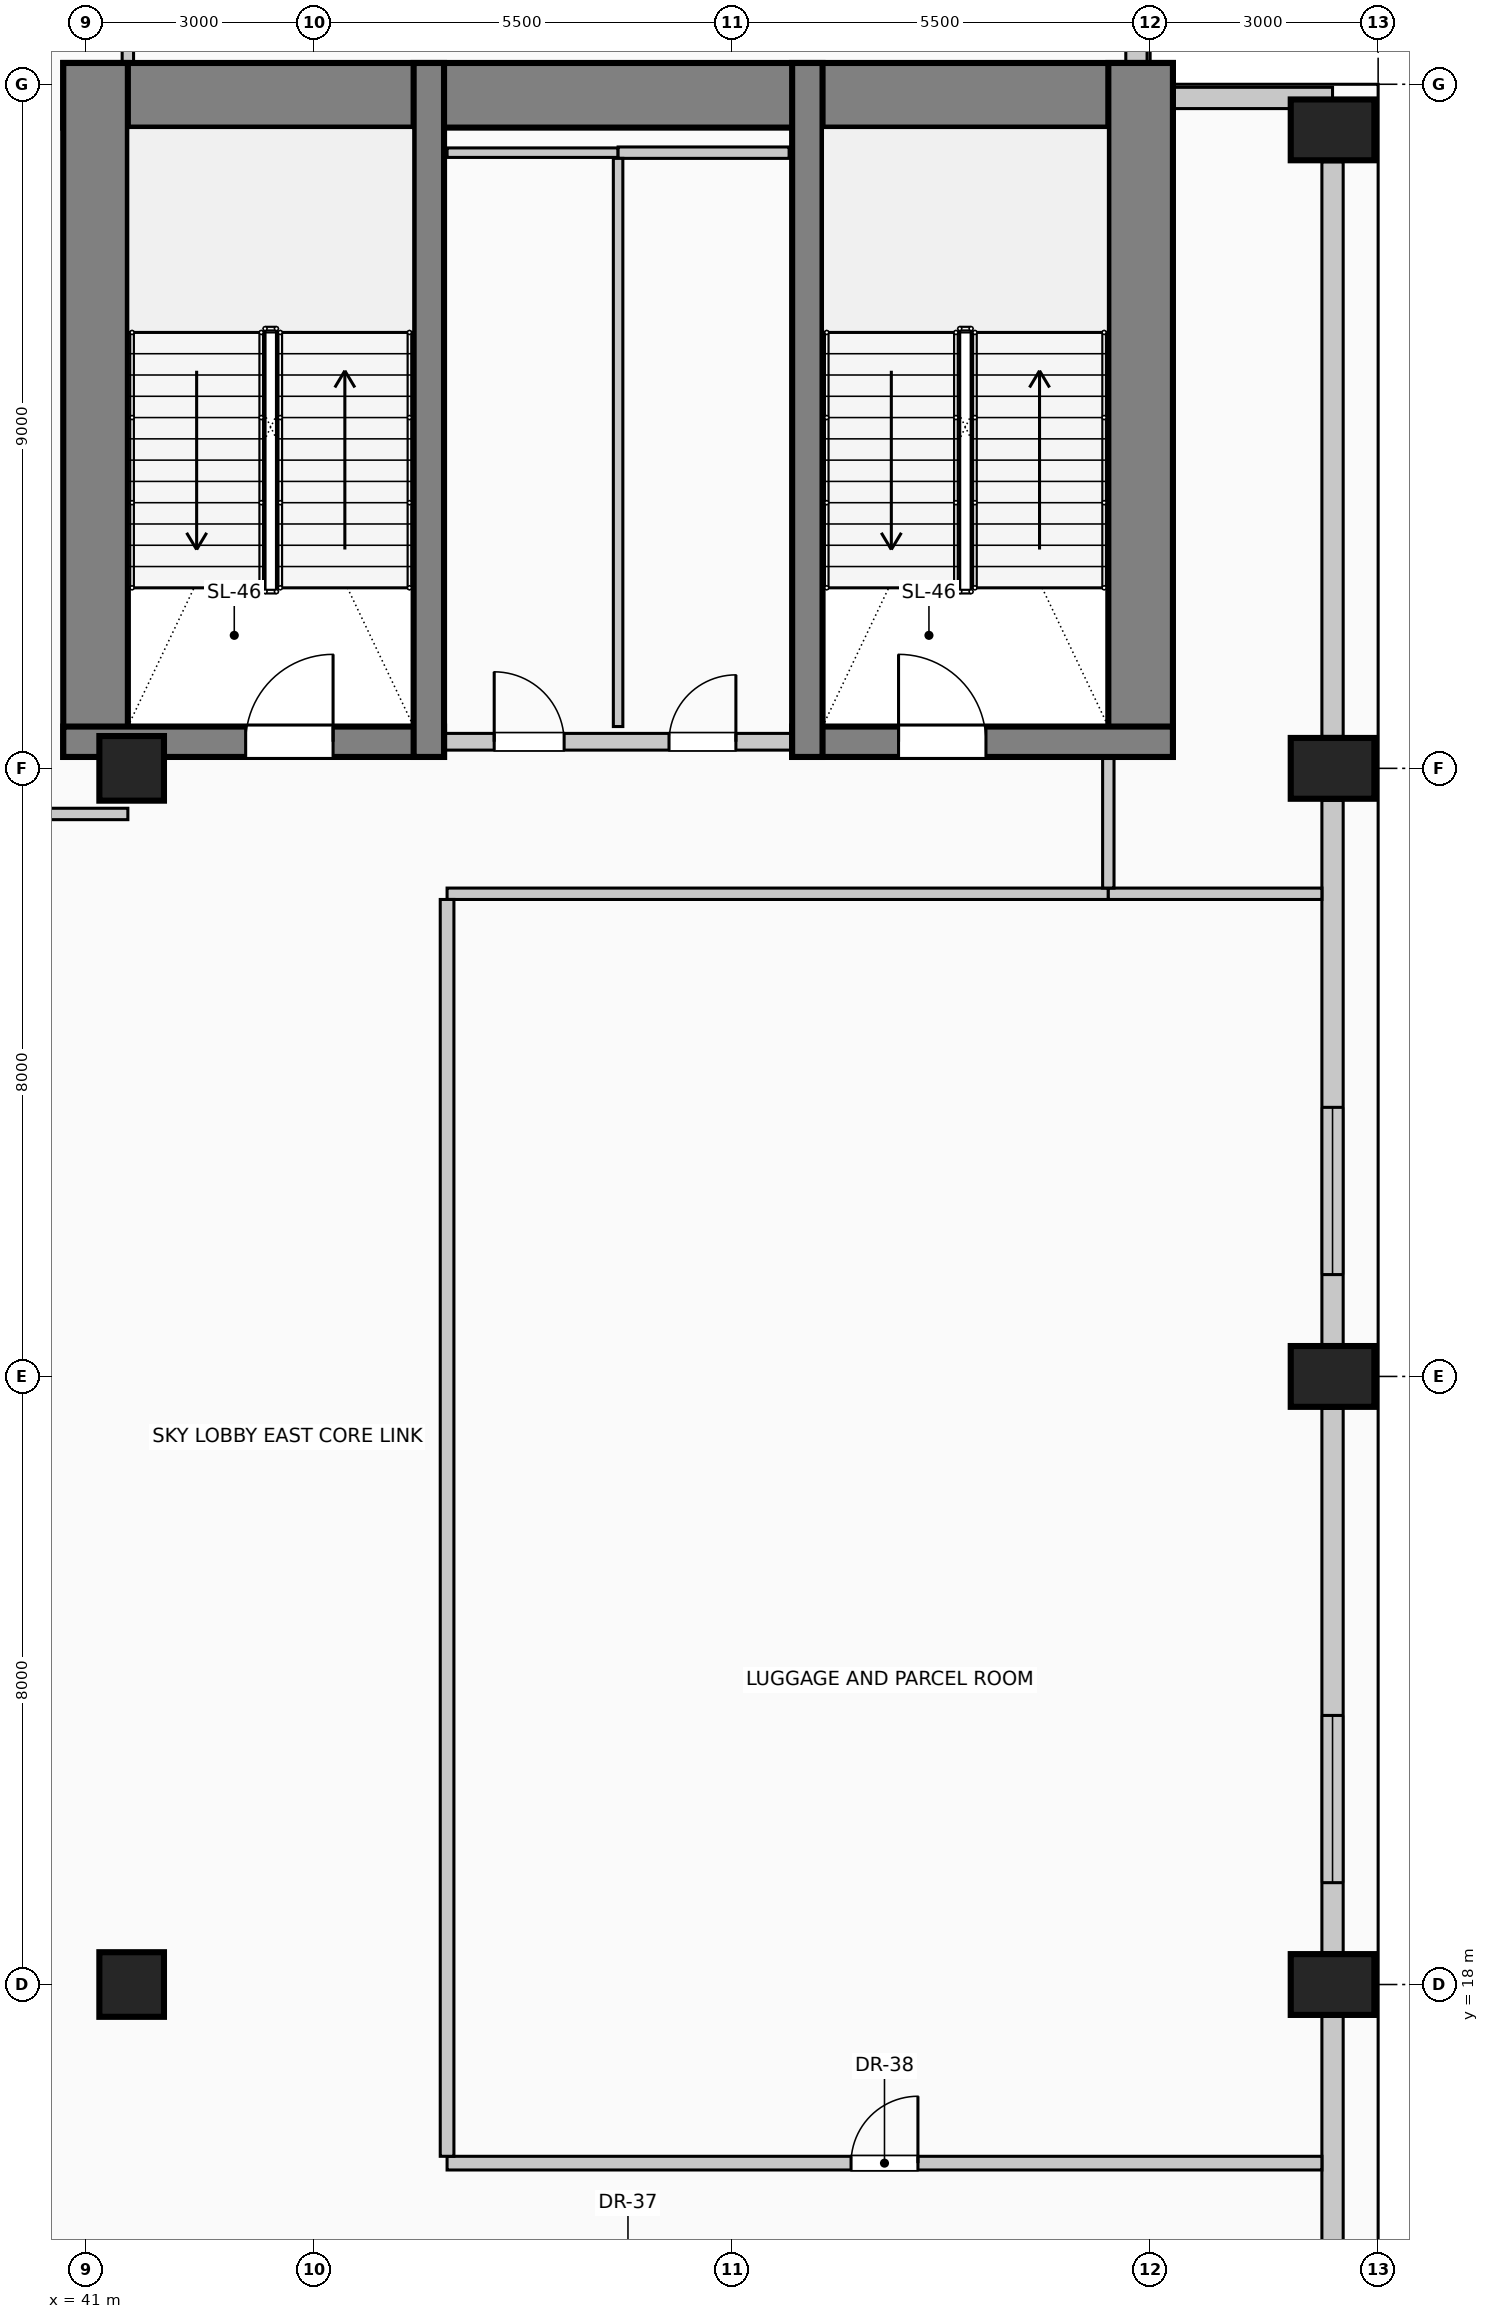
"""IFC4 building model, lengths in metres.
Left out: names, types, materials, properties, quantities, classifications, styles, units other than length and angle.
Written with IfcOpenShell. Run it as: python <this file> out.ifc"""

import sys

from ifc_helpers import new_model, si_unit, direction, frame, frame_2d, origin, origin_2d, place, context, subcontext, project, spatial, rectangle, circle, extrude, element, fill, save


model = new_model("IFC4")
c1 = context("Model", 3, precision=1e-05, world=origin(), true_north=direction((0.0, 1.0)))
c2 = subcontext(c1, "Body", "Model", "MODEL_VIEW")
j1 = project(units=[si_unit("LENGTHUNIT", "METRE"), si_unit("PLANEANGLEUNIT", "RADIAN")], contexts=[c1])
p1 = place(None, origin())
s1 = spatial("IfcSite", under=j1, at=p1, CompositionType="ELEMENT")
p2 = place(p1, origin())
s2 = spatial("IfcBuilding", under=s1, at=p2, CompositionType="ELEMENT")
p3 = place(p2, frame((0.0, 0.0, 165.8)))
s3 = spatial("IfcBuildingStorey", under=s2, at=p3, CompositionType="ELEMENT", Elevation=165.8)
p4 = place(p3, frame((40.7, 42.855, 0.0), z_axis=(0.0, 0.0, 1.0), x_axis=(1.0, 0.0, 0.0)))
e1 = element("IfcWall", 1, at=p4, inside=s3, PredefinedType="SHEAR", context=c2, shape_type="SweptSolid", body=[
    extrude(rectangle(XDim=14.6, YDim=0.85, at=frame_2d((7.3, 0.0))), origin(), (0.0, 0.0, 1.0), 4.8),
])
for number, where, z_axis, x_axis in (
    (2, (41.125, 34.15, 0.0), (0.0, 0.0, 1.0), (0.0, 1.0, 0.0)),
    (3, (54.875, 34.15, 0.0), (0.0, 0.0, 1.0), (0.0, 1.0, 0.0)),
):
    element("IfcWall", number, at=place(p3, frame(where, z_axis=z_axis, x_axis=x_axis)), inside=s3, PredefinedType="SHEAR", context=c2, shape_type="SweptSolid", body=[
        extrude(rectangle(XDim=9.13, YDim=0.85, at=frame_2d((4.565, 0.0))), origin(), (0.0, 0.0, 1.0), 4.8),
    ])
p5 = place(p3, frame((40.7, 34.35, 0.0), z_axis=(0.0, 0.0, 1.0), x_axis=(1.0, 0.0, 0.0)))
e4 = element("IfcWall", 4, at=p5, inside=s3, PredefinedType="SHEAR", context=c2, shape_type="SweptSolid", body=[
    extrude(rectangle(XDim=5.01, YDim=0.4, at=frame_2d((2.505, 0.0))), origin(), (0.0, 0.0, 1.0), 4.8),
])
p6 = place(p5, frame((2.4, 0.0, 0.0)))
e5 = element("IfcOpeningElement", 5, at=p6, cuts=e4, PredefinedType="OPENING", context=c2, shape_type="SweptSolid", body=[
    extrude(rectangle(XDim=1.15, YDim=2.2, at=frame_2d((0.575, 1.1))), frame((0.0, 0.21, 0.0), z_axis=(0.0, -1.0, 0.0), x_axis=(1.0, 0.0, 0.0)), (0.0, 0.0, 1.0), 0.42),
])
p7 = place(p3, frame((45.51, 34.15, 0.0), z_axis=(0.0, 0.0, 1.0), x_axis=(0.0, 1.0, 0.0)))
e6 = element("IfcWall", 6, at=p7, inside=s3, PredefinedType="SHEAR", context=c2, shape_type="SweptSolid", body=[
    extrude(rectangle(XDim=9.13, YDim=0.4, at=frame_2d((4.565, 0.0))), origin(), (0.0, 0.0, 1.0), 4.8),
])
p8 = place(p3, frame((50.29, 34.35, 0.0), z_axis=(0.0, 0.0, 1.0), x_axis=(1.0, 0.0, 0.0)))
e7 = element("IfcWall", 7, at=p8, inside=s3, PredefinedType="SHEAR", context=c2, shape_type="SweptSolid", body=[
    extrude(rectangle(XDim=5.01, YDim=0.4, at=frame_2d((2.505, 0.0))), origin(), (0.0, 0.0, 1.0), 4.8),
])
p9 = place(p8, frame((1.4, 0.0, 0.0)))
e8 = element("IfcOpeningElement", 8, at=p9, cuts=e7, PredefinedType="OPENING", context=c2, shape_type="SweptSolid", body=[
    extrude(rectangle(XDim=1.15, YDim=2.2, at=frame_2d((0.575, 1.1))), frame((0.0, 0.21, 0.0), z_axis=(0.0, -1.0, 0.0), x_axis=(1.0, 0.0, 0.0)), (0.0, 0.0, 1.0), 0.42),
])
p10 = place(p3, frame((50.49, 34.15, 0.0), z_axis=(0.0, 0.0, 1.0), x_axis=(0.0, 1.0, 0.0)))
e9 = element("IfcWall", 9, at=p10, inside=s3, PredefinedType="SHEAR", context=c2, shape_type="SweptSolid", body=[
    extrude(rectangle(XDim=9.13, YDim=0.4, at=frame_2d((4.565, 0.0))), origin(), (0.0, 0.0, 1.0), 4.8),
])
for number, where, z_axis, x_axis in (
    (10, (57.4, 18.0, 0.0), (0.0, 0.0, 1.0), (0.0, 1.0, 0.0)),
    (11, (57.4, 26.0, 0.0), (0.0, 0.0, 1.0), (0.0, 1.0, 0.0)),
    (12, (57.4, 34.0, 0.0), (0.0, 0.0, 1.0), (0.0, 1.0, 0.0)),
    (13, (57.4, 42.4, 0.0), (0.0, 0.0, 1.0), (0.0, 1.0, 0.0)),
):
    element("IfcColumn", number, at=place(p3, frame(where, z_axis=z_axis, x_axis=x_axis)), inside=s3, PredefinedType="COLUMN", context=c2, shape_type="SweptSolid", body=[
        extrude(rectangle(XDim=0.8, YDim=1.1, at=origin_2d()), origin(), (0.0, 0.0, 1.0), 4.8),
    ])
for number, where, z_axis, x_axis in (
    (14, (41.6, 18.0, 0.0), (0.0, 0.0, 1.0), (1.0, 0.0, 0.0)),
    (15, (41.6, 34.0, 0.0), (0.0, 0.0, 1.0), (1.0, 0.0, 0.0)),
):
    element("IfcColumn", number, at=place(p3, frame(where, z_axis=z_axis, x_axis=x_axis)), inside=s3, PredefinedType="COLUMN", context=c2, shape_type="SweptSolid", body=[
        extrude(circle(Radius=0.425, at=origin_2d()), origin(), (0.0, 0.0, 1.0), 4.8),
    ])
p11 = place(p3, frame((57.4, 17.58, 0.0), z_axis=(0.0, 0.0, 1.0), x_axis=(0.0, -1.0, 0.0)))
e16 = element("IfcWall", 16, at=p11, inside=s3, PredefinedType="SOLIDWALL", context=c2, shape_type="SweptSolid", body=[
    extrude(rectangle(XDim=7.16, YDim=0.28, at=frame_2d((3.58, 0.0))), origin(), (0.0, 0.0, 1.0), 3.675),
])
p12 = place(p3, frame((57.4, 25.58, 0.0), z_axis=(0.0, 0.0, 1.0), x_axis=(0.0, -1.0, 0.0)))
e17 = element("IfcWall", 17, at=p12, inside=s3, PredefinedType="SOLIDWALL", context=c2, shape_type="SweptSolid", body=[
    extrude(rectangle(XDim=7.16, YDim=0.28, at=frame_2d((3.58, 0.0))), origin(), (0.0, 0.0, 1.0), 3.675),
])
p13 = place(p12, frame((4.04, 0.0, 0.5)))
e18 = element("IfcOpeningElement", 18, at=p13, cuts=e17, PredefinedType="OPENING", context=c2, shape_type="SweptSolid", body=[
    extrude(rectangle(XDim=2.2, YDim=1.95, at=frame_2d((1.1, 0.975))), frame((0.0, 0.15, 0.0), z_axis=(0.0, -1.0, 0.0), x_axis=(1.0, 0.0, 0.0)), (0.0, 0.0, 1.0), 0.3),
])
p14 = place(p3, frame((57.4, 33.58, 0.0), z_axis=(0.0, 0.0, 1.0), x_axis=(0.0, -1.0, 0.0)))
e19 = element("IfcWall", 19, at=p14, inside=s3, PredefinedType="SOLIDWALL", context=c2, shape_type="SweptSolid", body=[
    extrude(rectangle(XDim=7.16, YDim=0.28, at=frame_2d((3.58, 0.0))), origin(), (0.0, 0.0, 1.0), 3.675),
])
p15 = place(p14, frame((4.04, 0.0, 0.5)))
e20 = element("IfcOpeningElement", 20, at=p15, cuts=e19, PredefinedType="OPENING", context=c2, shape_type="SweptSolid", body=[
    extrude(rectangle(XDim=2.2, YDim=1.95, at=frame_2d((1.1, 0.975))), frame((0.0, 0.15, 0.0), z_axis=(0.0, -1.0, 0.0), x_axis=(1.0, 0.0, 0.0)), (0.0, 0.0, 1.0), 0.3),
])
p16 = place(p3, frame((57.4, 41.98, 0.0), z_axis=(0.0, 0.0, 1.0), x_axis=(0.0, -1.0, 0.0)))
e21 = element("IfcWall", 21, at=p16, inside=s3, PredefinedType="SOLIDWALL", context=c2, shape_type="SweptSolid", body=[
    extrude(rectangle(XDim=7.56, YDim=0.28, at=frame_2d((3.78, 0.0))), origin(), (0.0, 0.0, 1.0), 3.675),
])
p17 = place(p3, frame((54.82, 45.4, 0.0), z_axis=(0.0, 0.0, 1.0), x_axis=(0.0, -1.0, 0.0)))
e22 = element("IfcWall", 22, at=p17, inside=s3, PredefinedType="SOLIDWALL", context=c2, shape_type="SweptSolid", body=[
    extrude(rectangle(XDim=2.115, YDim=0.28, at=frame_2d((1.058, 0.0))), origin(), (0.0, 0.0, 1.0), 4.525),
])
p18 = place(p3, frame((55.305, 42.82, 0.0), z_axis=(0.0, 0.0, 1.0), x_axis=(1.0, 0.0, 0.0)))
e23 = element("IfcWall", 23, at=p18, inside=s3, PredefinedType="SOLIDWALL", context=c2, shape_type="SweptSolid", body=[
    extrude(rectangle(XDim=2.095, YDim=0.28, at=frame_2d((1.047, 0.0))), origin(), (0.0, 0.0, 1.0), 4.525),
])
p19 = place(p3, frame((45.72, 34.35, 0.0), z_axis=(0.0, 0.0, 1.0), x_axis=(1.0, 0.0, 0.0)))
e24 = element("IfcWall", 24, at=p19, inside=s3, PredefinedType="PARTITIONING", context=c2, shape_type="SweptSolid", body=[
    extrude(rectangle(XDim=4.56, YDim=0.22, at=frame_2d((2.28, 0.0))), origin(), (0.0, 0.0, 1.0), 4.525),
])
p20 = place(p19, frame((0.65, 0.0, 0.0)))
e25 = element("IfcOpeningElement", 25, at=p20, cuts=e24, PredefinedType="OPENING", context=c2, shape_type="SweptSolid", body=[
    extrude(rectangle(XDim=0.92, YDim=2.1, at=frame_2d((0.46, 1.05))), frame((0.0, 0.12, 0.0), z_axis=(0.0, -1.0, 0.0), x_axis=(1.0, 0.0, 0.0)), (0.0, 0.0, 1.0), 0.24),
])
p21 = place(p19, frame((2.95, 0.0, 0.0)))
e26 = element("IfcOpeningElement", 26, at=p21, cuts=e24, PredefinedType="OPENING", context=c2, shape_type="SweptSolid", body=[
    extrude(rectangle(XDim=0.88, YDim=2.1, at=frame_2d((0.44, 1.05))), frame((0.0, 0.12, 0.0), z_axis=(0.0, -1.0, 0.0), x_axis=(1.0, 0.0, 0.0)), (0.0, 0.0, 1.0), 0.24),
])
p22 = place(p3, frame((45.75, 15.65, 0.0), z_axis=(0.0, 0.0, 1.0), x_axis=(1.0, 0.0, 0.0)))
e27 = element("IfcWall", 27, at=p22, inside=s3, PredefinedType="PARTITIONING", context=c2, shape_type="SweptSolid", body=[
    extrude(rectangle(XDim=11.51, YDim=0.18, at=frame_2d((5.755, 0.0))), origin(), (0.0, 0.0, 1.0), 4.525),
])
p23 = place(p22, frame((5.315, 0.0, 0.0)))
e28 = element("IfcOpeningElement", 28, at=p23, cuts=e27, PredefinedType="OPENING", context=c2, shape_type="SweptSolid", body=[
    extrude(rectangle(XDim=0.88, YDim=2.1, at=frame_2d((0.44, 1.05))), frame((0.0, 0.1, 0.0), z_axis=(0.0, -1.0, 0.0), x_axis=(1.0, 0.0, 0.0)), (0.0, 0.0, 1.0), 0.2),
])
p24 = place(p3, frame((45.75, 32.35, 0.0), z_axis=(0.0, 0.0, 1.0), x_axis=(1.0, 0.0, 0.0)))
e29 = element("IfcWall", 29, at=p24, inside=s3, PredefinedType="PARTITIONING", context=c2, shape_type="SweptSolid", body=[
    extrude(rectangle(XDim=8.7, YDim=0.15, at=frame_2d((4.35, 0.0))), origin(), (0.0, 0.0, 1.0), 4.525),
])
p25 = place(p3, frame((54.45, 32.35, 0.0), z_axis=(0.0, 0.0, 1.0), x_axis=(1.0, 0.0, 0.0)))
e30 = element("IfcWall", 30, at=p25, inside=s3, PredefinedType="PARTITIONING", context=c2, shape_type="SweptSolid", body=[
    extrude(rectangle(XDim=2.81, YDim=0.15, at=frame_2d((1.405, 0.0))), origin(), (0.0, 0.0, 1.0), 4.525),
])
p26 = place(p3, frame((16.75, 33.4, 0.0), z_axis=(0.0, 0.0, 1.0), x_axis=(1.0, 0.0, 0.0)))
e31 = element("IfcWall", 31, at=p26, inside=s3, PredefinedType="PARTITIONING", context=c2, shape_type="SweptSolid", body=[
    extrude(rectangle(XDim=24.8, YDim=0.15, at=frame_2d((12.4, 0.0))), origin(), (0.0, 0.0, 1.0), 4.525),
])
p27 = place(p26, frame((14.035, 0.0, 0.0)))
e32 = element("IfcOpeningElement", 32, at=p27, cuts=e31, PredefinedType="OPENING", context=c2, shape_type="SweptSolid", body=[
    extrude(rectangle(XDim=1.05, YDim=2.15, at=frame_2d((0.525, 1.075))), frame((0.0, 0.085, 0.0), z_axis=(0.0, -1.0, 0.0), x_axis=(1.0, 0.0, 0.0)), (0.0, 0.0, 1.0), 0.17),
])
p28 = place(p3, frame((45.75, 42.1, 0.0), z_axis=(0.0, 0.0, 1.0), x_axis=(1.0, 0.0, 0.0)))
e33 = element("IfcWall", 33, at=p28, inside=s3, PredefinedType="PARTITIONING", context=c2, shape_type="SweptSolid", body=[
    extrude(rectangle(XDim=2.25, YDim=0.125, at=frame_2d((1.125, 0.0))), origin(), (0.0, 0.0, 1.0), 4.525),
])
p29 = place(p3, frame((48.0, 42.1, 0.0), z_axis=(0.0, 0.0, 1.0), x_axis=(1.0, 0.0, 0.0)))
e34 = element("IfcWall", 34, at=p29, inside=s3, PredefinedType="PARTITIONING", context=c2, shape_type="SweptSolid", body=[
    extrude(rectangle(XDim=2.25, YDim=0.15, at=frame_2d((1.125, 0.0))), origin(), (0.0, 0.0, 1.0), 4.525),
])
p30 = place(p3, frame((41.55, 43.28, 0.0), z_axis=(0.0, 0.0, 1.0), x_axis=(0.0, 1.0, 0.0)))
e35 = element("IfcWall", 35, at=p30, inside=s3, PredefinedType="PARTITIONING", context=c2, shape_type="SweptSolid", body=[
    extrude(rectangle(XDim=1.47, YDim=0.15, at=frame_2d((0.735, 0.0))), origin(), (0.0, 0.0, 1.0), 4.525),
])
p31 = place(p3, frame((45.75, 15.74, 0.0), z_axis=(0.0, 0.0, 1.0), x_axis=(0.0, 1.0, 0.0)))
e36 = element("IfcWall", 36, at=p31, inside=s3, PredefinedType="PARTITIONING", context=c2, shape_type="SweptSolid", body=[
    extrude(rectangle(XDim=16.535, YDim=0.18, at=frame_2d((8.268, 0.0))), origin(), (0.0, 0.0, 1.0), 4.525),
])
p32 = place(p3, frame((48.0, 34.55, 0.0), z_axis=(0.0, 0.0, 1.0), x_axis=(0.0, 1.0, 0.0)))
e37 = element("IfcWall", 37, at=p32, inside=s3, PredefinedType="PARTITIONING", context=c2, shape_type="SweptSolid", body=[
    extrude(rectangle(XDim=7.475, YDim=0.125, at=frame_2d((3.737, 0.0))), origin(), (0.0, 0.0, 1.0), 4.525),
])
p33 = place(p3, frame((54.45, 32.425, 0.0), z_axis=(0.0, 0.0, 1.0), x_axis=(0.0, 1.0, 0.0)))
e38 = element("IfcWall", 38, at=p33, inside=s3, PredefinedType="PARTITIONING", context=c2, shape_type="SweptSolid", body=[
    extrude(rectangle(XDim=1.725, YDim=0.15, at=frame_2d((0.862, 0.0))), origin(), (0.0, 0.0, 1.0), 4.525),
])
p34 = place(p13, origin())
e39 = element("IfcWindow", 39, at=p34, inside=s3, PartitioningType="SINGLE_PANEL", PredefinedType="WINDOW", context=c2, shape_type="SweptSolid", body=[
    extrude(rectangle(XDim=2.2, YDim=1.95, at=frame_2d((1.1, 0.975))), frame((0.0, 0.03, 0.0), z_axis=(0.0, -1.0, 0.0), x_axis=(1.0, 0.0, 0.0)), (0.0, 0.0, 1.0), 0.06),
])
fill(e18, e39)
p35 = place(p15, origin())
e40 = element("IfcWindow", 40, at=p35, inside=s3, PartitioningType="SINGLE_PANEL", PredefinedType="WINDOW", context=c2, shape_type="SweptSolid", body=[
    extrude(rectangle(XDim=2.2, YDim=1.95, at=frame_2d((1.1, 0.975))), frame((0.0, 0.03, 0.0), z_axis=(0.0, -1.0, 0.0), x_axis=(1.0, 0.0, 0.0)), (0.0, 0.0, 1.0), 0.06),
])
fill(e20, e40)
p36 = place(p6, origin())
e41 = element("IfcDoor", 41, at=p36, inside=s3, OperationType="SINGLE_SWING_RIGHT", PredefinedType="DOOR", context=c2, shape_type="SweptSolid", body=[
    extrude(rectangle(XDim=1.15, YDim=2.2, at=frame_2d((0.575, 1.1))), frame((0.0, 0.025, 0.0), z_axis=(0.0, -1.0, 0.0), x_axis=(1.0, 0.0, 0.0)), (0.0, 0.0, 1.0), 0.05),
])
fill(e5, e41)
p37 = place(p20, origin())
e42 = element("IfcDoor", 42, at=p37, inside=s3, OperationType="SINGLE_SWING_LEFT", PredefinedType="DOOR", context=c2, shape_type="SweptSolid", body=[
    extrude(rectangle(XDim=0.92, YDim=2.1, at=frame_2d((0.46, 1.05))), frame((0.0, 0.025, 0.0), z_axis=(0.0, -1.0, 0.0), x_axis=(1.0, 0.0, 0.0)), (0.0, 0.0, 1.0), 0.05),
])
fill(e25, e42)
p38 = place(p21, origin())
e43 = element("IfcDoor", 43, at=p38, inside=s3, OperationType="SINGLE_SWING_RIGHT", PredefinedType="DOOR", context=c2, shape_type="SweptSolid", body=[
    extrude(rectangle(XDim=0.88, YDim=2.1, at=frame_2d((0.44, 1.05))), frame((0.0, 0.025, 0.0), z_axis=(0.0, -1.0, 0.0), x_axis=(1.0, 0.0, 0.0)), (0.0, 0.0, 1.0), 0.05),
])
fill(e26, e43)
p39 = place(p9, origin())
e44 = element("IfcDoor", 44, at=p39, inside=s3, OperationType="SINGLE_SWING_LEFT", PredefinedType="DOOR", context=c2, shape_type="SweptSolid", body=[
    extrude(rectangle(XDim=1.15, YDim=2.2, at=frame_2d((0.575, 1.1))), frame((0.0, 0.025, 0.0), z_axis=(0.0, -1.0, 0.0), x_axis=(1.0, 0.0, 0.0)), (0.0, 0.0, 1.0), 0.05),
])
fill(e8, e44)
p40 = place(p23, origin())
e45 = element("IfcDoor", 45, at=p40, inside=s3, OperationType="SINGLE_SWING_RIGHT", PredefinedType="DOOR", context=c2, shape_type="SweptSolid", body=[
    extrude(rectangle(XDim=0.88, YDim=2.1, at=frame_2d((0.44, 1.05))), frame((0.0, 0.025, 0.0), z_axis=(0.0, -1.0, 0.0), x_axis=(1.0, 0.0, 0.0)), (0.0, 0.0, 1.0), 0.05),
])
fill(e28, e45)
save(model, sys.argv[1])
